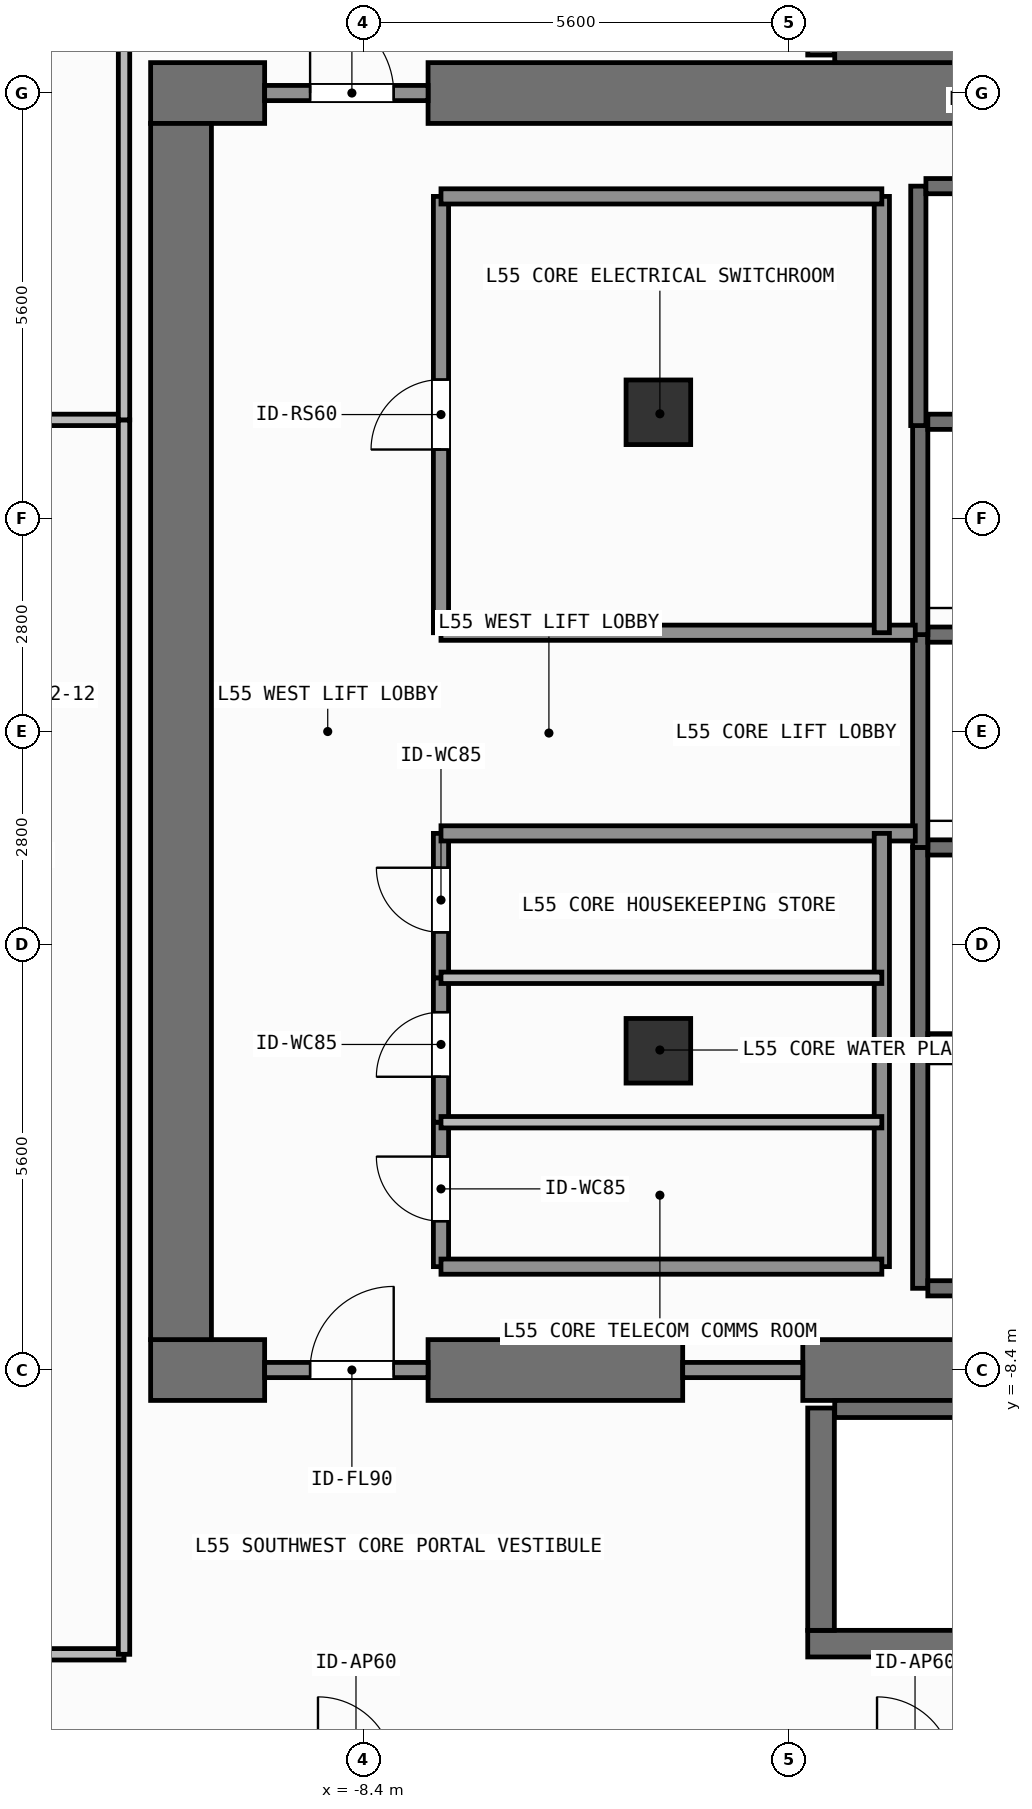
"""IFC4 building model, lengths in metres.
Left out: names, types, materials, properties, quantities, classifications, styles, units other than length and angle.
Written with IfcOpenShell. Run it as: python <this file> out.ifc"""

import sys

from ifc_helpers import new_model, si_unit, direction, frame, frame_2d, origin, origin_2d, place, context, subcontext, project, spatial, rectangle, extrude, element, fill, save


model = new_model("IFC4")
c1 = context("Model", 3, precision=1e-05, world=origin(), true_north=direction((0.0, 1.0)))
c2 = subcontext(c1, "Body", "Model", "MODEL_VIEW")
j1 = project(units=[si_unit("LENGTHUNIT", "METRE"), si_unit("PLANEANGLEUNIT", "RADIAN")], contexts=[c1])
p1 = place(None, origin())
s1 = spatial("IfcSite", under=j1, at=p1, CompositionType="ELEMENT")
p2 = place(p1, origin())
s2 = spatial("IfcBuilding", under=s1, at=p2, CompositionType="ELEMENT")
p3 = place(p2, frame((0.0, 0.0, 223.5)))
s3 = spatial("IfcBuildingStorey", under=s2, at=p3, CompositionType="ELEMENT", Elevation=223.5)
p4 = place(p3, frame((-11.2, -8.4, 0.0), z_axis=(0.0, 0.0, 1.0), x_axis=(1.0, 0.0, 0.0)))
e1 = element("IfcWall", 1, at=p4, inside=s3, PredefinedType="SHEAR", context=c2, shape_type="SweptSolid", body=[
    extrude(rectangle(XDim=1.5, YDim=0.8, at=frame_2d((0.75, 0.0))), origin(), (0.0, 0.0, 1.0), 3.9),
])
p5 = place(p3, frame((-7.55, -8.4, 0.0), z_axis=(0.0, 0.0, 1.0), x_axis=(1.0, 0.0, 0.0)))
e2 = element("IfcWall", 2, at=p5, inside=s3, PredefinedType="SHEAR", context=c2, shape_type="SweptSolid", body=[
    extrude(rectangle(XDim=3.35, YDim=0.8, at=frame_2d((1.675, 0.0))), origin(), (0.0, 0.0, 1.0), 3.9),
])
p6 = place(p3, frame((-2.62, -8.4, 0.0), z_axis=(0.0, 0.0, 1.0), x_axis=(1.0, 0.0, 0.0)))
e3 = element("IfcWall", 3, at=p6, inside=s3, PredefinedType="SHEAR", context=c2, shape_type="SweptSolid", body=[
    extrude(rectangle(XDim=7.27, YDim=0.8, at=frame_2d((3.635, 0.0))), origin(), (0.0, 0.0, 1.0), 3.9),
])
p7 = place(p3, frame((-11.2, 8.4, 0.0), z_axis=(0.0, 0.0, 1.0), x_axis=(1.0, 0.0, 0.0)))
e4 = element("IfcWall", 4, at=p7, inside=s3, PredefinedType="SHEAR", context=c2, shape_type="SweptSolid", body=[
    extrude(rectangle(XDim=1.5, YDim=0.8, at=frame_2d((0.75, 0.0))), origin(), (0.0, 0.0, 1.0), 3.9),
])
p8 = place(p3, frame((-7.55, 8.4, 0.0), z_axis=(0.0, 0.0, 1.0), x_axis=(1.0, 0.0, 0.0)))
e5 = element("IfcWall", 5, at=p8, inside=s3, PredefinedType="SHEAR", context=c2, shape_type="SweptSolid", body=[
    extrude(rectangle(XDim=16.35, YDim=0.8, at=frame_2d((8.175, 0.0))), origin(), (0.0, 0.0, 1.0), 3.9),
])
p9 = place(p3, frame((-10.8, -8.0, 0.0), z_axis=(0.0, 0.0, 1.0), x_axis=(0.0, 1.0, 0.0)))
e6 = element("IfcWall", 6, at=p9, inside=s3, PredefinedType="SHEAR", context=c2, shape_type="SweptSolid", body=[
    extrude(rectangle(XDim=16.0, YDim=0.8, at=frame_2d((8.0, 0.0))), origin(), (0.0, 0.0, 1.0), 3.9),
])
p10 = place(p3, frame((-2.555, -12.0, 0.0), z_axis=(0.0, 0.0, 1.0), x_axis=(1.0, 0.0, 0.0)))
e7 = element("IfcWall", 7, at=p10, inside=s3, PredefinedType="SHEAR", context=c2, shape_type="SweptSolid", body=[
    extrude(rectangle(XDim=7.31, YDim=0.35, at=frame_2d((3.655, 0.0))), origin(), (0.0, 0.0, 1.0), 3.9),
])
p11 = place(p3, frame((-2.2, -8.913, 0.0), z_axis=(0.0, 0.0, 1.0), x_axis=(1.0, 0.0, 0.0)))
e8 = element("IfcWall", 8, at=p11, inside=s3, PredefinedType="SHEAR", context=c2, shape_type="SweptSolid", body=[
    extrude(rectangle(XDim=6.6, YDim=0.225, at=frame_2d((3.3, 0.0))), origin(), (0.0, 0.0, 1.0), 3.9),
])
p12 = place(p3, frame((-2.38, -11.825, 0.0), z_axis=(0.0, 0.0, 1.0), x_axis=(0.0, 1.0, 0.0)))
e9 = element("IfcWall", 9, at=p12, inside=s3, PredefinedType="SHEAR", context=c2, shape_type="SweptSolid", body=[
    extrude(rectangle(XDim=2.925, YDim=0.35, at=frame_2d((1.462, 0.0))), origin(), (0.0, 0.0, 1.0), 3.9),
])
p13 = place(p3, frame((-2.2, 8.913, 0.0), z_axis=(0.0, 0.0, 1.0), x_axis=(1.0, 0.0, 0.0)))
e10 = element("IfcWall", 10, at=p13, inside=s3, PredefinedType="SHEAR", context=c2, shape_type="SweptSolid", body=[
    extrude(rectangle(XDim=6.6, YDim=0.225, at=frame_2d((3.3, 0.0))), origin(), (0.0, 0.0, 1.0), 3.9),
])
p14 = place(p3, frame((-2.38, 8.9, 0.0), z_axis=(0.0, 0.0, 1.0), x_axis=(0.0, 1.0, 0.0)))
e11 = element("IfcWall", 11, at=p14, inside=s3, PredefinedType="SHEAR", context=c2, shape_type="SweptSolid", body=[
    extrude(rectangle(XDim=2.925, YDim=0.35, at=frame_2d((1.462, 0.0))), origin(), (0.0, 0.0, 1.0), 3.9),
])
for number, where, z_axis, x_axis in (
    (12, (-4.52, -4.2, 0.0), (0.0, 0.0, 1.0), (1.0, 0.0, 0.0)),
    (13, (-4.52, 4.2, 0.0), (0.0, 0.0, 1.0), (1.0, 0.0, 0.0)),
):
    element("IfcColumn", number, at=place(p3, frame(where, z_axis=z_axis, x_axis=x_axis)), inside=s3, PredefinedType="COLUMN", context=c2, shape_type="SweptSolid", body=[
        extrude(rectangle(XDim=0.85, YDim=0.85, at=origin_2d()), origin(), (0.0, 0.0, 1.0), 3.9),
    ])
p15 = place(p3, frame((-1.075, -4.275, 0.0), z_axis=(0.0, 0.0, 1.0), x_axis=(0.0, 1.0, 0.0)))
e14 = element("IfcWall", 14, at=p15, inside=s3, PredefinedType="SHEAR", context=c2, shape_type="SweptSolid", body=[
    extrude(rectangle(XDim=2.75, YDim=0.2, at=frame_2d((1.375, 0.0))), origin(), (0.0, 0.0, 1.0), 3.68),
])
for number, where, z_axis, x_axis in (
    (15, (-0.975, -4.075, 0.0), (0.0, 0.0, 1.0), (1.0, 0.0, 0.0)),
    (16, (-0.975, -1.525, 0.0), (0.0, 0.0, 1.0), (1.0, 0.0, 0.0)),
):
    element("IfcWall", number, at=place(p3, frame(where, z_axis=z_axis, x_axis=x_axis)), inside=s3, PredefinedType="SHEAR", context=c2, shape_type="SweptSolid", body=[
        extrude(rectangle(XDim=2.35, YDim=0.2, at=frame_2d((1.175, 0.0))), origin(), (0.0, 0.0, 1.0), 3.68),
    ])
p16 = place(p3, frame((-1.075, -1.525, 0.0), z_axis=(0.0, 0.0, 1.0), x_axis=(0.0, 1.0, 0.0)))
e17 = element("IfcWall", 17, at=p16, inside=s3, PredefinedType="SHEAR", context=c2, shape_type="SweptSolid", body=[
    extrude(rectangle(XDim=2.8, YDim=0.2, at=frame_2d((1.4, 0.0))), origin(), (0.0, 0.0, 1.0), 3.68),
])
p17 = place(p3, frame((-0.975, 1.275, 0.0), z_axis=(0.0, 0.0, 1.0), x_axis=(1.0, 0.0, 0.0)))
e18 = element("IfcWall", 18, at=p17, inside=s3, PredefinedType="SHEAR", context=c2, shape_type="SweptSolid", body=[
    extrude(rectangle(XDim=2.35, YDim=0.2, at=frame_2d((1.175, 0.0))), origin(), (0.0, 0.0, 1.0), 3.68),
])
p18 = place(p3, frame((-1.075, 1.275, 0.0), z_axis=(0.0, 0.0, 1.0), x_axis=(0.0, 1.0, 0.0)))
e19 = element("IfcWall", 19, at=p18, inside=s3, PredefinedType="SHEAR", context=c2, shape_type="SweptSolid", body=[
    extrude(rectangle(XDim=2.8, YDim=0.2, at=frame_2d((1.4, 0.0))), origin(), (0.0, 0.0, 1.0), 3.68),
])
p19 = place(p3, frame((-0.975, 4.075, 0.0), z_axis=(0.0, 0.0, 1.0), x_axis=(1.0, 0.0, 0.0)))
e20 = element("IfcWall", 20, at=p19, inside=s3, PredefinedType="SHEAR", context=c2, shape_type="SweptSolid", body=[
    extrude(rectangle(XDim=2.35, YDim=0.2, at=frame_2d((1.175, 0.0))), origin(), (0.0, 0.0, 1.0), 3.68),
])
p20 = place(p3, frame((-1.1, 4.025, 0.0), z_axis=(0.0, 0.0, 1.0), x_axis=(0.0, 1.0, 0.0)))
e21 = element("IfcWall", 21, at=p20, inside=s3, PredefinedType="SHEAR", context=c2, shape_type="SweptSolid", body=[
    extrude(rectangle(XDim=3.15, YDim=0.2, at=frame_2d((1.575, 0.0))), origin(), (0.0, 0.0, 1.0), 3.68),
])
p21 = place(p3, frame((-1.0, 7.175, 0.0), z_axis=(0.0, 0.0, 1.0), x_axis=(1.0, 0.0, 0.0)))
e22 = element("IfcWall", 22, at=p21, inside=s3, PredefinedType="SHEAR", context=c2, shape_type="SweptSolid", body=[
    extrude(rectangle(XDim=2.4, YDim=0.2, at=frame_2d((1.2, 0.0))), origin(), (0.0, 0.0, 1.0), 3.68),
])
p22 = place(p3, frame((-1.075, -7.325, 0.0), z_axis=(0.0, 0.0, 1.0), x_axis=(0.0, 1.0, 0.0)))
e23 = element("IfcWall", 23, at=p22, inside=s3, PredefinedType="SHEAR", context=c2, shape_type="SweptSolid", body=[
    extrude(rectangle(XDim=3.05, YDim=0.2, at=frame_2d((1.525, 0.0))), origin(), (0.0, 0.0, 1.0), 3.68),
])
p23 = place(p3, frame((-0.975, -7.325, 0.0), z_axis=(0.0, 0.0, 1.0), x_axis=(1.0, 0.0, 0.0)))
e24 = element("IfcWall", 24, at=p23, inside=s3, PredefinedType="SHEAR", context=c2, shape_type="SweptSolid", body=[
    extrude(rectangle(XDim=2.35, YDim=0.2, at=frame_2d((1.175, 0.0))), origin(), (0.0, 0.0, 1.0), 3.68),
])
p24 = place(p3, frame((-9.7, -8.4, 0.0), z_axis=(0.0, 0.0, 1.0), x_axis=(1.0, 0.0, 0.0)))
e25 = element("IfcWall", 25, at=p24, inside=s3, PredefinedType="SOLIDWALL", context=c2, shape_type="SweptSolid", body=[
    extrude(rectangle(XDim=2.15, YDim=0.2, at=frame_2d((1.075, 0.0))), origin(), (0.0, 0.0, 1.0), 2.82),
])
p25 = place(p24, frame((0.598, 0.0, 0.0)))
e26 = element("IfcOpeningElement", 26, at=p25, cuts=e25, PredefinedType="OPENING", context=c2, shape_type="SweptSolid", body=[
    extrude(rectangle(XDim=1.1, YDim=2.15, at=frame_2d((0.55, 1.075))), frame((0.0, 0.11, 0.0), z_axis=(0.0, -1.0, 0.0), x_axis=(1.0, 0.0, 0.0)), (0.0, 0.0, 1.0), 0.22),
])
p26 = place(p3, frame((-9.7, 8.4, 0.0), z_axis=(0.0, 0.0, 1.0), x_axis=(1.0, 0.0, 0.0)))
e27 = element("IfcWall", 27, at=p26, inside=s3, PredefinedType="SOLIDWALL", context=c2, shape_type="SweptSolid", body=[
    extrude(rectangle(XDim=2.15, YDim=0.2, at=frame_2d((1.075, 0.0))), origin(), (0.0, 0.0, 1.0), 2.82),
])
p27 = place(p26, frame((0.598, 0.0, 0.0)))
e28 = element("IfcOpeningElement", 28, at=p27, cuts=e27, PredefinedType="OPENING", context=c2, shape_type="SweptSolid", body=[
    extrude(rectangle(XDim=1.1, YDim=2.15, at=frame_2d((0.55, 1.075))), frame((0.0, 0.11, 0.0), z_axis=(0.0, -1.0, 0.0), x_axis=(1.0, 0.0, 0.0)), (0.0, 0.0, 1.0), 0.22),
])
p28 = place(p3, frame((-7.38, -7.04, 0.0), z_axis=(0.0, 0.0, 1.0), x_axis=(0.0, 1.0, 0.0)))
e29 = element("IfcWall", 29, at=p28, inside=s3, PredefinedType="SOLIDWALL", context=c2, shape_type="SweptSolid", body=[
    extrude(rectangle(XDim=1.9, YDim=0.2, at=frame_2d((0.95, 0.0))), origin(), (0.0, 0.0, 1.0), 3.68),
])
p29 = place(p28, frame((0.598, 0.0, 0.0)))
e30 = element("IfcOpeningElement", 30, at=p29, cuts=e29, PredefinedType="OPENING", context=c2, shape_type="SweptSolid", body=[
    extrude(rectangle(XDim=0.85, YDim=2.1, at=frame_2d((0.425, 1.05))), frame((0.0, 0.11, 0.0), z_axis=(0.0, -1.0, 0.0), x_axis=(1.0, 0.0, 0.0)), (0.0, 0.0, 1.0), 0.22),
])
p30 = place(p3, frame((-7.38, -5.14, 0.0), z_axis=(0.0, 0.0, 1.0), x_axis=(0.0, 1.0, 0.0)))
e31 = element("IfcWall", 31, at=p30, inside=s3, PredefinedType="SOLIDWALL", context=c2, shape_type="SweptSolid", body=[
    extrude(rectangle(XDim=1.9, YDim=0.2, at=frame_2d((0.95, 0.0))), origin(), (0.0, 0.0, 1.0), 3.68),
])
p31 = place(p30, frame((0.598, 0.0, 0.0)))
e32 = element("IfcOpeningElement", 32, at=p31, cuts=e31, PredefinedType="OPENING", context=c2, shape_type="SweptSolid", body=[
    extrude(rectangle(XDim=0.85, YDim=2.1, at=frame_2d((0.425, 1.05))), frame((0.0, 0.11, 0.0), z_axis=(0.0, -1.0, 0.0), x_axis=(1.0, 0.0, 0.0)), (0.0, 0.0, 1.0), 0.22),
])
p32 = place(p3, frame((-7.38, -3.24, 0.0), z_axis=(0.0, 0.0, 1.0), x_axis=(0.0, 1.0, 0.0)))
e33 = element("IfcWall", 33, at=p32, inside=s3, PredefinedType="SOLIDWALL", context=c2, shape_type="SweptSolid", body=[
    extrude(rectangle(XDim=1.9, YDim=0.2, at=frame_2d((0.95, 0.0))), origin(), (0.0, 0.0, 1.0), 3.68),
])
p33 = place(p32, frame((0.598, 0.0, 0.0)))
e34 = element("IfcOpeningElement", 34, at=p33, cuts=e33, PredefinedType="OPENING", context=c2, shape_type="SweptSolid", body=[
    extrude(rectangle(XDim=0.85, YDim=2.1, at=frame_2d((0.425, 1.05))), frame((0.0, 0.11, 0.0), z_axis=(0.0, -1.0, 0.0), x_axis=(1.0, 0.0, 0.0)), (0.0, 0.0, 1.0), 0.22),
])
p34 = place(p3, frame((-7.38, 1.3, 0.0), z_axis=(0.0, 0.0, 1.0), x_axis=(0.0, 1.0, 0.0)))
e35 = element("IfcWall", 35, at=p34, inside=s3, PredefinedType="SOLIDWALL", context=c2, shape_type="SweptSolid", body=[
    extrude(rectangle(XDim=5.74, YDim=0.2, at=frame_2d((2.87, 0.0))), origin(), (0.0, 0.0, 1.0), 3.68),
])
p35 = place(p34, frame((2.41, 0.0, 0.0)))
e36 = element("IfcOpeningElement", 36, at=p35, cuts=e35, PredefinedType="OPENING", context=c2, shape_type="SweptSolid", body=[
    extrude(rectangle(XDim=0.92, YDim=2.1, at=frame_2d((0.46, 1.05))), frame((0.0, 0.11, 0.0), z_axis=(0.0, -1.0, 0.0), x_axis=(1.0, 0.0, 0.0)), (0.0, 0.0, 1.0), 0.22),
])
p36 = place(p3, frame((-18.33, -12.14, 0.0), z_axis=(0.0, 0.0, 1.0), x_axis=(1.0, 0.0, 0.0)))
e37 = element("IfcWall", 37, at=p36, inside=s3, PredefinedType="PARTITIONING", context=c2, shape_type="SweptSolid", body=[
    extrude(rectangle(XDim=6.78, YDim=0.15, at=frame_2d((3.39, 0.0))), origin(), (0.0, 0.0, 1.0), 3.68),
])
p37 = place(p36, frame((2.85, 0.0, 0.0)))
e38 = element("IfcOpeningElement", 38, at=p37, cuts=e37, PredefinedType="OPENING", context=c2, shape_type="SweptSolid", body=[
    extrude(rectangle(XDim=0.9, YDim=2.1, at=frame_2d((0.45, 1.05))), frame((0.0, 0.085, 0.0), z_axis=(0.0, -1.0, 0.0), x_axis=(1.0, 0.0, 0.0)), (0.0, 0.0, 1.0), 0.17),
])
p38 = place(p3, frame((-4.2, -8.4, 0.0), z_axis=(0.0, 0.0, 1.0), x_axis=(1.0, 0.0, 0.0)))
e39 = element("IfcWall", 39, at=p38, inside=s3, PredefinedType="SOLIDWALL", context=c2, shape_type="SweptSolid", body=[
    extrude(rectangle(XDim=1.58, YDim=0.2, at=frame_2d((0.79, 0.0))), origin(), (0.0, 0.0, 1.0), 2.82),
])
for number, where, z_axis, x_axis in (
    (40, (-7.38, -1.34, 0.0), (0.0, 0.0, 1.0), (1.0, 0.0, 0.0)),
    (41, (-7.38, 1.3, 0.0), (0.0, 0.0, 1.0), (1.0, 0.0, 0.0)),
):
    element("IfcWall", number, at=place(p3, frame(where, z_axis=z_axis, x_axis=x_axis)), inside=s3, PredefinedType="SOLIDWALL", context=c2, shape_type="SweptSolid", body=[
        extrude(rectangle(XDim=6.24, YDim=0.2, at=frame_2d((3.12, 0.0))), origin(), (0.0, 0.0, 1.0), 3.68),
    ])
p39 = place(p3, frame((-1.58, -7.04, 0.0), z_axis=(0.0, 0.0, 1.0), x_axis=(0.0, 1.0, 0.0)))
e42 = element("IfcWall", 42, at=p39, inside=s3, PredefinedType="SOLIDWALL", context=c2, shape_type="SweptSolid", body=[
    extrude(rectangle(XDim=5.7, YDim=0.2, at=frame_2d((2.85, 0.0))), origin(), (0.0, 0.0, 1.0), 3.68),
])
p40 = place(p3, frame((-7.38, -7.04, 0.0), z_axis=(0.0, 0.0, 1.0), x_axis=(1.0, 0.0, 0.0)))
e43 = element("IfcWall", 43, at=p40, inside=s3, PredefinedType="SOLIDWALL", context=c2, shape_type="SweptSolid", body=[
    extrude(rectangle(XDim=5.8, YDim=0.2, at=frame_2d((2.9, 0.0))), origin(), (0.0, 0.0, 1.0), 3.68),
])
p41 = place(p3, frame((-1.58, 1.3, 0.0), z_axis=(0.0, 0.0, 1.0), x_axis=(0.0, 1.0, 0.0)))
e44 = element("IfcWall", 44, at=p41, inside=s3, PredefinedType="SOLIDWALL", context=c2, shape_type="SweptSolid", body=[
    extrude(rectangle(XDim=5.74, YDim=0.2, at=frame_2d((2.87, 0.0))), origin(), (0.0, 0.0, 1.0), 3.68),
])
p42 = place(p3, frame((-7.38, 7.04, 0.0), z_axis=(0.0, 0.0, 1.0), x_axis=(1.0, 0.0, 0.0)))
e45 = element("IfcWall", 45, at=p42, inside=s3, PredefinedType="SOLIDWALL", context=c2, shape_type="SweptSolid", body=[
    extrude(rectangle(XDim=5.8, YDim=0.2, at=frame_2d((2.9, 0.0))), origin(), (0.0, 0.0, 1.0), 3.68),
])
for number, where, z_axis, x_axis in (
    (46, (-7.38, -5.14, 0.0), (0.0, 0.0, 1.0), (1.0, 0.0, 0.0)),
    (47, (-7.38, -3.24, 0.0), (0.0, 0.0, 1.0), (1.0, 0.0, 0.0)),
):
    element("IfcWall", number, at=place(p3, frame(where, z_axis=z_axis, x_axis=x_axis)), inside=s3, PredefinedType="PARTITIONING", context=c2, shape_type="SweptSolid", body=[
        extrude(rectangle(XDim=5.8, YDim=0.15, at=frame_2d((2.9, 0.0))), origin(), (0.0, 0.0, 1.0), 3.68),
    ])
p43 = place(p3, frame((-18.33, 4.1, 0.0), z_axis=(0.0, 0.0, 1.0), x_axis=(1.0, 0.0, 0.0)))
e48 = element("IfcWall", 48, at=p43, inside=s3, PredefinedType="PARTITIONING", context=c2, shape_type="SweptSolid", body=[
    extrude(rectangle(XDim=6.78, YDim=0.15, at=frame_2d((3.39, 0.0))), origin(), (0.0, 0.0, 1.0), 3.68),
])
p44 = place(p3, frame((-11.55, -12.14, 0.0), z_axis=(0.0, 0.0, 1.0), x_axis=(0.0, 1.0, 0.0)))
e49 = element("IfcWall", 49, at=p44, inside=s3, PredefinedType="PARTITIONING", context=c2, shape_type="SweptSolid", body=[
    extrude(rectangle(XDim=16.24, YDim=0.15, at=frame_2d((8.12, 0.0))), origin(), (0.0, 0.0, 1.0), 3.68),
])
p45 = place(p3, frame((-11.55, 4.1, 0.0), z_axis=(0.0, 0.0, 1.0), x_axis=(0.0, 1.0, 0.0)))
e50 = element("IfcWall", 50, at=p45, inside=s3, PredefinedType="PARTITIONING", context=c2, shape_type="SweptSolid", body=[
    extrude(rectangle(XDim=8.04, YDim=0.15, at=frame_2d((4.02, 0.0))), origin(), (0.0, 0.0, 1.0), 3.68),
])
p46 = place(p25, origin())
e51 = element("IfcDoor", 51, at=p46, inside=s3, OperationType="SINGLE_SWING_RIGHT", PredefinedType="DOOR", context=c2, shape_type="SweptSolid", body=[
    extrude(rectangle(XDim=1.1, YDim=2.15, at=frame_2d((0.55, 1.075))), frame((0.0, 0.025, 0.0), z_axis=(0.0, -1.0, 0.0), x_axis=(1.0, 0.0, 0.0)), (0.0, 0.0, 1.0), 0.05),
])
fill(e26, e51)
p47 = place(p27, origin())
e52 = element("IfcDoor", 52, at=p47, inside=s3, OperationType="SINGLE_SWING_LEFT", PredefinedType="DOOR", context=c2, shape_type="SweptSolid", body=[
    extrude(rectangle(XDim=1.1, YDim=2.15, at=frame_2d((0.55, 1.075))), frame((0.0, 0.025, 0.0), z_axis=(0.0, -1.0, 0.0), x_axis=(1.0, 0.0, 0.0)), (0.0, 0.0, 1.0), 0.05),
])
fill(e28, e52)
p48 = place(p29, origin())
e53 = element("IfcDoor", 53, at=p48, inside=s3, OperationType="SINGLE_SWING_RIGHT", PredefinedType="DOOR", context=c2, shape_type="SweptSolid", body=[
    extrude(rectangle(XDim=0.85, YDim=2.1, at=frame_2d((0.425, 1.05))), frame((0.0, 0.025, 0.0), z_axis=(0.0, -1.0, 0.0), x_axis=(1.0, 0.0, 0.0)), (0.0, 0.0, 1.0), 0.05),
])
fill(e30, e53)
p49 = place(p31, origin())
e54 = element("IfcDoor", 54, at=p49, inside=s3, OperationType="SINGLE_SWING_LEFT", PredefinedType="DOOR", context=c2, shape_type="SweptSolid", body=[
    extrude(rectangle(XDim=0.85, YDim=2.1, at=frame_2d((0.425, 1.05))), frame((0.0, 0.025, 0.0), z_axis=(0.0, -1.0, 0.0), x_axis=(1.0, 0.0, 0.0)), (0.0, 0.0, 1.0), 0.05),
])
fill(e32, e54)
p50 = place(p33, origin())
e55 = element("IfcDoor", 55, at=p50, inside=s3, OperationType="SINGLE_SWING_RIGHT", PredefinedType="DOOR", context=c2, shape_type="SweptSolid", body=[
    extrude(rectangle(XDim=0.85, YDim=2.1, at=frame_2d((0.425, 1.05))), frame((0.0, 0.025, 0.0), z_axis=(0.0, -1.0, 0.0), x_axis=(1.0, 0.0, 0.0)), (0.0, 0.0, 1.0), 0.05),
])
fill(e34, e55)
p51 = place(p35, origin())
e56 = element("IfcDoor", 56, at=p51, inside=s3, OperationType="SINGLE_SWING_LEFT", PredefinedType="DOOR", context=c2, shape_type="SweptSolid", body=[
    extrude(rectangle(XDim=0.92, YDim=2.1, at=frame_2d((0.46, 1.05))), frame((0.0, 0.025, 0.0), z_axis=(0.0, -1.0, 0.0), x_axis=(1.0, 0.0, 0.0)), (0.0, 0.0, 1.0), 0.05),
])
fill(e36, e56)
save(model, sys.argv[1])
